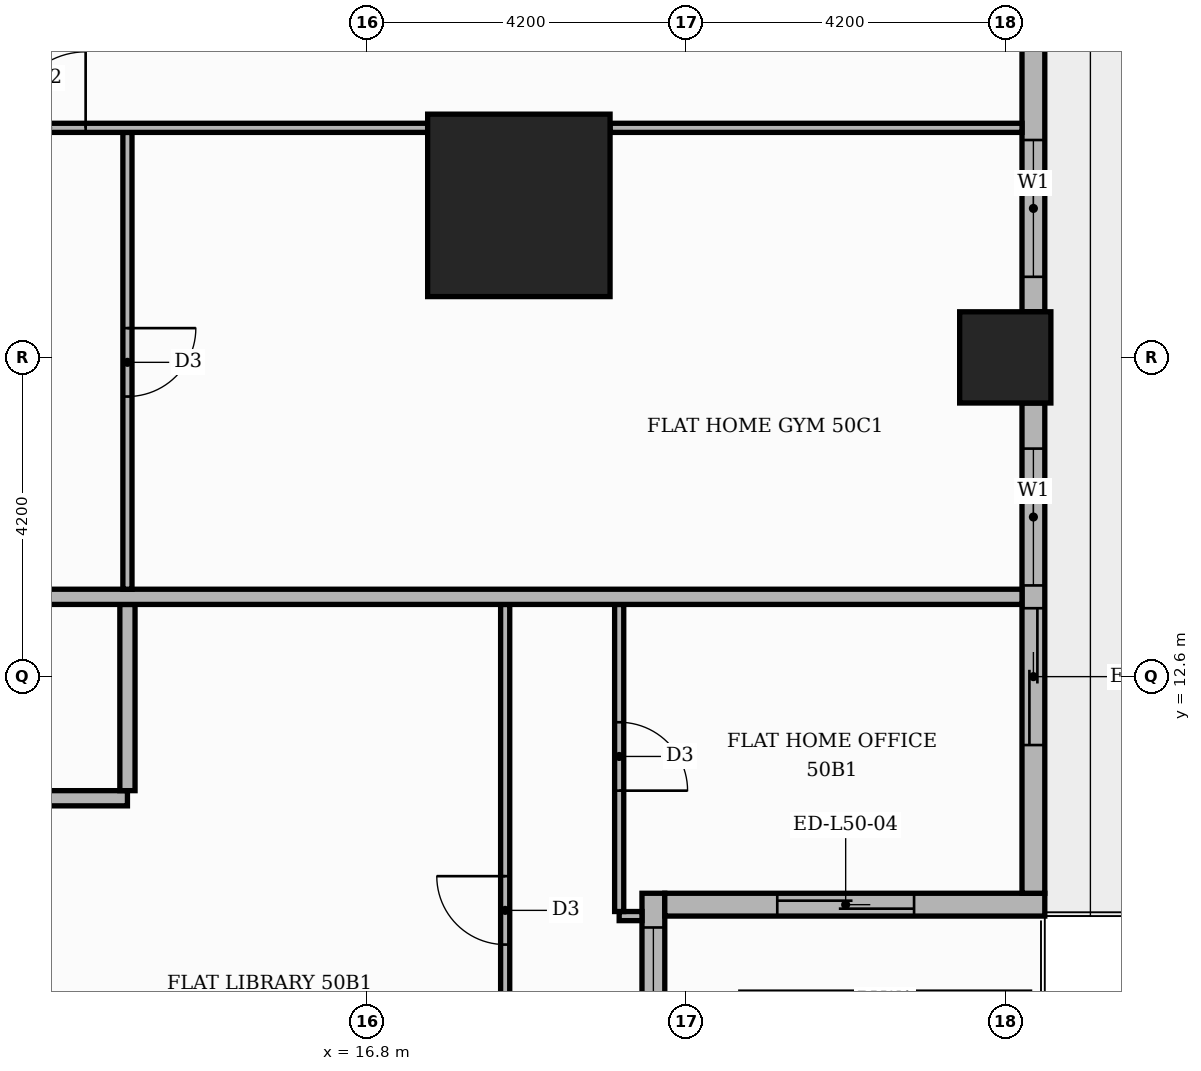
"""IFC4 building model, lengths in metres.
Left out: names, types, materials, properties, quantities, classifications, styles, units other than length and angle.
Written with IfcOpenShell. Run it as: python <this file> out.ifc"""

import sys

from ifc_helpers import new_model, si_unit, direction, frame, frame_2d, origin, origin_2d, place, context, subcontext, project, spatial, rectangle, extrude, element, fill, save


model = new_model("IFC4")
c1 = context("Model", 3, precision=1e-05, world=origin(), true_north=direction((0.0, 1.0)))
c2 = subcontext(c1, "Body", "Model", "MODEL_VIEW")
j1 = project(units=[si_unit("LENGTHUNIT", "METRE"), si_unit("PLANEANGLEUNIT", "RADIAN")], contexts=[c1])
p1 = place(None, origin())
s1 = spatial("IfcSite", under=j1, at=p1, CompositionType="ELEMENT")
p2 = place(p1, origin())
s2 = spatial("IfcBuilding", under=s1, at=p2, CompositionType="ELEMENT")
p3 = place(p2, frame((0.0, 0.0, 211.8)))
s3 = spatial("IfcBuildingStorey", under=s2, at=p3, CompositionType="ELEMENT", Elevation=211.8)
p4 = place(p3, frame((18.8, 18.8, 0.0), z_axis=(0.0, 0.0, 1.0), x_axis=(1.0, 0.0, 0.0)))
e1 = element("IfcColumn", 1, at=p4, inside=s3, PredefinedType="COLUMN", context=c2, shape_type="SweptSolid", body=[
    extrude(rectangle(XDim=2.4, YDim=2.4, at=origin_2d()), origin(), (0.0, 0.0, 1.0), 3.9),
])
p5 = place(p3, frame((25.2, 16.8, 0.0), z_axis=(0.0, 0.0, 1.0), x_axis=(1.0, 0.0, 0.0)))
e2 = element("IfcColumn", 2, at=p5, inside=s3, PredefinedType="COLUMN", context=c2, shape_type="SweptSolid", body=[
    extrude(rectangle(XDim=1.2, YDim=1.2, at=origin_2d()), origin(), (0.0, 0.0, 1.0), 3.9),
])
p6 = place(p3, frame((20.57, -9.45, 0.0), z_axis=(0.0, 0.0, 1.0), x_axis=(0.0, 1.0, 0.0)))
e3 = element("IfcWall", 3, at=p6, inside=s3, PredefinedType="STANDARD", context=c2, shape_type="SweptSolid", body=[
    extrude(rectangle(XDim=19.2, YDim=0.3, at=frame_2d((9.6, 0.0))), origin(), (0.0, 0.0, 1.0), 3.48),
])
p7 = place(p6, frame((0.15, 0.0, 0.9)))
e4 = element("IfcOpeningElement", 4, at=p7, cuts=e3, PredefinedType="OPENING", context=c2, shape_type="SweptSolid", body=[
    extrude(rectangle(XDim=6.0, YDim=2.1, at=frame_2d((3.0, 1.05))), frame((0.0, 0.16, 0.0), z_axis=(0.0, -1.0, 0.0), x_axis=(1.0, 0.0, 0.0)), (0.0, 0.0, 1.0), 0.32),
])
p8 = place(p6, frame((6.45, 0.0, 0.9)))
e5 = element("IfcOpeningElement", 5, at=p8, cuts=e3, PredefinedType="OPENING", context=c2, shape_type="SweptSolid", body=[
    extrude(rectangle(XDim=6.0, YDim=2.1, at=frame_2d((3.0, 1.05))), frame((0.0, 0.16, 0.0), z_axis=(0.0, -1.0, 0.0), x_axis=(1.0, 0.0, 0.0)), (0.0, 0.0, 1.0), 0.32),
])
p9 = place(p6, frame((12.75, 0.0, 0.9)))
e6 = element("IfcOpeningElement", 6, at=p9, cuts=e3, PredefinedType="OPENING", context=c2, shape_type="SweptSolid", body=[
    extrude(rectangle(XDim=6.0, YDim=2.1, at=frame_2d((3.0, 1.05))), frame((0.0, 0.16, 0.0), z_axis=(0.0, -1.0, 0.0), x_axis=(1.0, 0.0, 0.0)), (0.0, 0.0, 1.0), 0.32),
])
p10 = place(p3, frame((20.72, 9.6, 0.0), z_axis=(0.0, 0.0, 1.0), x_axis=(1.0, 0.0, 0.0)))
e7 = element("IfcWall", 7, at=p10, inside=s3, PredefinedType="STANDARD", context=c2, shape_type="SweptSolid", body=[
    extrude(rectangle(XDim=5.0, YDim=0.3, at=frame_2d((2.5, 0.0))), origin(), (0.0, 0.0, 1.0), 3.48),
])
p11 = place(p10, frame((1.48, 0.0, 0.0)))
e8 = element("IfcOpeningElement", 8, at=p11, cuts=e7, PredefinedType="OPENING", context=c2, shape_type="SweptSolid", body=[
    extrude(rectangle(XDim=1.8, YDim=2.4, at=frame_2d((0.9, 1.2))), frame((0.0, 0.16, 0.0), z_axis=(0.0, -1.0, 0.0), x_axis=(1.0, 0.0, 0.0)), (0.0, 0.0, 1.0), 0.32),
])
p12 = place(p3, frame((25.57, 9.75, 0.0), z_axis=(0.0, 0.0, 1.0), x_axis=(0.0, 1.0, 0.0)))
e9 = element("IfcWall", 9, at=p12, inside=s3, PredefinedType="STANDARD", context=c2, shape_type="SweptSolid", body=[
    extrude(rectangle(XDim=6.45, YDim=0.3, at=frame_2d((3.225, 0.0))), origin(), (0.0, 0.0, 1.0), 3.48),
])
p13 = place(p12, frame((1.95, 0.0, 0.0)))
e10 = element("IfcOpeningElement", 10, at=p13, cuts=e9, PredefinedType="OPENING", context=c2, shape_type="SweptSolid", body=[
    extrude(rectangle(XDim=1.8, YDim=2.4, at=frame_2d((0.9, 1.2))), frame((0.0, 0.16, 0.0), z_axis=(0.0, -1.0, 0.0), x_axis=(1.0, 0.0, 0.0)), (0.0, 0.0, 1.0), 0.32),
])
p14 = place(p12, frame((4.05, 0.0, 0.9)))
e11 = element("IfcOpeningElement", 11, at=p14, cuts=e9, PredefinedType="OPENING", context=c2, shape_type="SweptSolid", body=[
    extrude(rectangle(XDim=1.8, YDim=2.1, at=frame_2d((0.9, 1.05))), frame((0.0, 0.16, 0.0), z_axis=(0.0, -1.0, 0.0), x_axis=(1.0, 0.0, 0.0)), (0.0, 0.0, 1.0), 0.32),
])
p15 = place(p3, frame((25.57, 17.4, 0.0), z_axis=(0.0, 0.0, 1.0), x_axis=(0.0, 1.0, 0.0)))
e12 = element("IfcWall", 12, at=p15, inside=s3, PredefinedType="STANDARD", context=c2, shape_type="SweptSolid", body=[
    extrude(rectangle(XDim=3.82, YDim=0.3, at=frame_2d((1.91, 0.0))), origin(), (0.0, 0.0, 1.0), 3.48),
])
p16 = place(p15, frame((0.46, 0.0, 0.9)))
e13 = element("IfcOpeningElement", 13, at=p16, cuts=e12, PredefinedType="OPENING", context=c2, shape_type="SweptSolid", body=[
    extrude(rectangle(XDim=1.8, YDim=2.1, at=frame_2d((0.9, 1.05))), frame((0.0, 0.16, 0.0), z_axis=(0.0, -1.0, 0.0), x_axis=(1.0, 0.0, 0.0)), (0.0, 0.0, 1.0), 0.32),
])
p17 = place(p3, frame((18.62, 5.46, 0.0), z_axis=(0.0, 0.0, 1.0), x_axis=(0.0, 1.0, 0.0)))
e14 = element("IfcWall", 14, at=p17, inside=s3, PredefinedType="PARTITIONING", context=c2, shape_type="SweptSolid", body=[
    extrude(rectangle(XDim=8.09, YDim=0.12, at=frame_2d((4.045, 0.0))), origin(), (0.0, 0.0, 1.0), 3.48),
])
p18 = place(p17, frame((3.615, 0.0, 0.0)))
e15 = element("IfcOpeningElement", 15, at=p18, cuts=e14, PredefinedType="OPENING", context=c2, shape_type="SweptSolid", body=[
    extrude(rectangle(XDim=0.9, YDim=2.1, at=frame_2d((0.45, 1.05))), frame((0.0, 0.07, 0.0), z_axis=(0.0, -1.0, 0.0), x_axis=(1.0, 0.0, 0.0)), (0.0, 0.0, 1.0), 0.14),
])
p19 = place(p3, frame((20.12, 9.45, 0.0), z_axis=(0.0, 0.0, 1.0), x_axis=(1.0, 0.0, 0.0)))
e16 = element("IfcWall", 16, at=p19, inside=s3, PredefinedType="PARTITIONING", context=c2, shape_type="SweptSolid", body=[
    extrude(rectangle(XDim=0.3, YDim=0.12, at=frame_2d((0.15, 0.0))), origin(), (0.0, 0.0, 1.0), 3.48),
])
p20 = place(p3, frame((20.12, 9.51, 0.0), z_axis=(0.0, 0.0, 1.0), x_axis=(0.0, 1.0, 0.0)))
e17 = element("IfcWall", 17, at=p20, inside=s3, PredefinedType="PARTITIONING", context=c2, shape_type="SweptSolid", body=[
    extrude(rectangle(XDim=4.04, YDim=0.12, at=frame_2d((2.02, 0.0))), origin(), (0.0, 0.0, 1.0), 3.48),
])
p21 = place(p20, frame((1.59, 0.0, 0.0)))
e18 = element("IfcOpeningElement", 18, at=p21, cuts=e17, PredefinedType="OPENING", context=c2, shape_type="SweptSolid", body=[
    extrude(rectangle(XDim=0.9, YDim=2.1, at=frame_2d((0.45, 1.05))), frame((0.0, 0.07, 0.0), z_axis=(0.0, -1.0, 0.0), x_axis=(1.0, 0.0, 0.0)), (0.0, 0.0, 1.0), 0.14),
])
p22 = place(p3, frame((11.0, 11.0, 0.0), z_axis=(0.0, 0.0, 1.0), x_axis=(1.0, 0.0, 0.0)))
e19 = element("IfcWall", 19, at=p22, inside=s3, PredefinedType="PARTITIONING", context=c2, shape_type="SweptSolid", body=[
    extrude(rectangle(XDim=2.65, YDim=0.2, at=frame_2d((1.325, 0.0))), origin(), (0.0, 0.0, 1.0), 3.48),
])
p23 = place(p3, frame((13.65, 11.1, 0.0), z_axis=(0.0, 0.0, 1.0), x_axis=(0.0, 1.0, 0.0)))
e20 = element("IfcWall", 20, at=p23, inside=s3, PredefinedType="PARTITIONING", context=c2, shape_type="SweptSolid", body=[
    extrude(rectangle(XDim=2.45, YDim=0.2, at=frame_2d((1.225, 0.0))), origin(), (0.0, 0.0, 1.0), 3.48),
])
p24 = place(p3, frame((-13.65, 13.65, 0.0), z_axis=(0.0, 0.0, 1.0), x_axis=(1.0, 0.0, 0.0)))
e21 = element("IfcWall", 21, at=p24, inside=s3, PredefinedType="PARTITIONING", context=c2, shape_type="SweptSolid", body=[
    extrude(rectangle(XDim=39.07, YDim=0.2, at=frame_2d((19.535, 0.0))), origin(), (0.0, 0.0, 1.0), 3.48),
])
p25 = place(p24, frame((23.6, 0.0, 0.0)))
e22 = element("IfcOpeningElement", 22, at=p25, cuts=e21, PredefinedType="OPENING", context=c2, shape_type="SweptSolid", body=[
    extrude(rectangle(XDim=1.1, YDim=2.4, at=frame_2d((0.55, 1.2))), frame((0.0, 0.11, 0.0), z_axis=(0.0, -1.0, 0.0), x_axis=(1.0, 0.0, 0.0)), (0.0, 0.0, 1.0), 0.22),
])
p26 = place(p3, frame((13.65, 13.75, 0.0), z_axis=(0.0, 0.0, 1.0), x_axis=(0.0, 1.0, 0.0)))
e23 = element("IfcWall", 23, at=p26, inside=s3, PredefinedType="PARTITIONING", context=c2, shape_type="SweptSolid", body=[
    extrude(rectangle(XDim=6.01, YDim=0.12, at=frame_2d((3.005, 0.0))), origin(), (0.0, 0.0, 1.0), 3.48),
])
p27 = place(p26, frame((2.535, 0.0, 0.0)))
e24 = element("IfcOpeningElement", 24, at=p27, cuts=e23, PredefinedType="OPENING", context=c2, shape_type="SweptSolid", body=[
    extrude(rectangle(XDim=0.9, YDim=2.1, at=frame_2d((0.45, 1.05))), frame((0.0, 0.07, 0.0), z_axis=(0.0, -1.0, 0.0), x_axis=(1.0, 0.0, 0.0)), (0.0, 0.0, 1.0), 0.14),
])
p28 = place(p3, frame((-13.55, 19.82, 0.0), z_axis=(0.0, 0.0, 1.0), x_axis=(1.0, 0.0, 0.0)))
e25 = element("IfcWall", 25, at=p28, inside=s3, PredefinedType="PARTITIONING", context=c2, shape_type="SweptSolid", body=[
    extrude(rectangle(XDim=31.15, YDim=0.12, at=frame_2d((15.575, 0.0))), origin(), (0.0, 0.0, 1.0), 3.48),
])
p29 = place(p28, frame((25.65, 0.0, 0.0)))
e26 = element("IfcOpeningElement", 26, at=p29, cuts=e25, PredefinedType="OPENING", context=c2, shape_type="SweptSolid", body=[
    extrude(rectangle(XDim=1.0, YDim=2.1, at=frame_2d((0.5, 1.05))), frame((0.0, 0.07, 0.0), z_axis=(0.0, -1.0, 0.0), x_axis=(1.0, 0.0, 0.0)), (0.0, 0.0, 1.0), 0.14),
])
p30 = place(p28, frame((20.4, 0.0, 0.0)))
e27 = element("IfcOpeningElement", 27, at=p30, cuts=e25, PredefinedType="OPENING", context=c2, shape_type="SweptSolid", body=[
    extrude(rectangle(XDim=1.0, YDim=2.1, at=frame_2d((0.5, 1.05))), frame((0.0, 0.07, 0.0), z_axis=(0.0, -1.0, 0.0), x_axis=(1.0, 0.0, 0.0)), (0.0, 0.0, 1.0), 0.14),
])
p31 = place(p28, frame((13.1, 0.0, 0.0)))
e28 = element("IfcOpeningElement", 28, at=p31, cuts=e25, PredefinedType="OPENING", context=c2, shape_type="SweptSolid", body=[
    extrude(rectangle(XDim=0.9, YDim=2.1, at=frame_2d((0.45, 1.05))), frame((0.0, 0.07, 0.0), z_axis=(0.0, -1.0, 0.0), x_axis=(1.0, 0.0, 0.0)), (0.0, 0.0, 1.0), 0.14),
])
p32 = place(p28, frame((3.65, 0.0, 0.0)))
e29 = element("IfcOpeningElement", 29, at=p32, cuts=e25, PredefinedType="OPENING", context=c2, shape_type="SweptSolid", body=[
    extrude(rectangle(XDim=0.9, YDim=2.1, at=frame_2d((0.45, 1.05))), frame((0.0, 0.07, 0.0), z_axis=(0.0, -1.0, 0.0), x_axis=(1.0, 0.0, 0.0)), (0.0, 0.0, 1.0), 0.14),
])
p33 = place(p3, frame((20.0, 19.82, 0.0), z_axis=(0.0, 0.0, 1.0), x_axis=(1.0, 0.0, 0.0)))
e30 = element("IfcWall", 30, at=p33, inside=s3, PredefinedType="PARTITIONING", context=c2, shape_type="SweptSolid", body=[
    extrude(rectangle(XDim=5.42, YDim=0.12, at=frame_2d((2.71, 0.0))), origin(), (0.0, 0.0, 1.0), 3.48),
])
p34 = place(p9, origin())
e31 = element("IfcWindow", 31, at=p34, inside=s3, PartitioningType="SINGLE_PANEL", PredefinedType="WINDOW", context=c2, shape_type="SweptSolid", body=[
    extrude(rectangle(XDim=6.0, YDim=2.1, at=frame_2d((3.0, 1.05))), frame((0.0, 0.03, 0.0), z_axis=(0.0, -1.0, 0.0), x_axis=(1.0, 0.0, 0.0)), (0.0, 0.0, 1.0), 0.06),
])
fill(e6, e31)
p35 = place(p11, origin())
e32 = element("IfcDoor", 32, at=p35, inside=s3, OperationType="SLIDING_TO_RIGHT", PredefinedType="DOOR", context=c2, shape_type="SweptSolid", body=[
    extrude(rectangle(XDim=1.8, YDim=2.4, at=frame_2d((0.9, 1.2))), frame((0.0, 0.025, 0.0), z_axis=(0.0, -1.0, 0.0), x_axis=(1.0, 0.0, 0.0)), (0.0, 0.0, 1.0), 0.05),
])
fill(e8, e32)
p36 = place(p13, origin())
e33 = element("IfcDoor", 33, at=p36, inside=s3, OperationType="SLIDING_TO_RIGHT", PredefinedType="DOOR", context=c2, shape_type="SweptSolid", body=[
    extrude(rectangle(XDim=1.8, YDim=2.4, at=frame_2d((0.9, 1.2))), frame((0.0, 0.025, 0.0), z_axis=(0.0, -1.0, 0.0), x_axis=(1.0, 0.0, 0.0)), (0.0, 0.0, 1.0), 0.05),
])
fill(e10, e33)
p37 = place(p14, origin())
e34 = element("IfcWindow", 34, at=p37, inside=s3, PartitioningType="SINGLE_PANEL", PredefinedType="WINDOW", context=c2, shape_type="SweptSolid", body=[
    extrude(rectangle(XDim=1.8, YDim=2.1, at=frame_2d((0.9, 1.05))), frame((0.0, 0.03, 0.0), z_axis=(0.0, -1.0, 0.0), x_axis=(1.0, 0.0, 0.0)), (0.0, 0.0, 1.0), 0.06),
])
fill(e11, e34)
p38 = place(p16, origin())
e35 = element("IfcWindow", 35, at=p38, inside=s3, PartitioningType="SINGLE_PANEL", PredefinedType="WINDOW", context=c2, shape_type="SweptSolid", body=[
    extrude(rectangle(XDim=1.8, YDim=2.1, at=frame_2d((0.9, 1.05))), frame((0.0, 0.03, 0.0), z_axis=(0.0, -1.0, 0.0), x_axis=(1.0, 0.0, 0.0)), (0.0, 0.0, 1.0), 0.06),
])
fill(e13, e35)
p39 = place(p18, origin())
e36 = element("IfcDoor", 36, at=p39, inside=s3, OperationType="SINGLE_SWING_RIGHT", PredefinedType="DOOR", context=c2, shape_type="SweptSolid", body=[
    extrude(rectangle(XDim=0.9, YDim=2.1, at=frame_2d((0.45, 1.05))), frame((0.0, 0.025, 0.0), z_axis=(0.0, -1.0, 0.0), x_axis=(1.0, 0.0, 0.0)), (0.0, 0.0, 1.0), 0.05),
])
fill(e15, e36)
p40 = place(p21, frame((0.9, 0.0, 0.0), z_axis=(0.0, 0.0, 1.0), x_axis=(-1.0, 0.0, 0.0)))
e37 = element("IfcDoor", 37, at=p40, inside=s3, OperationType="SINGLE_SWING_LEFT", PredefinedType="DOOR", context=c2, shape_type="SweptSolid", body=[
    extrude(rectangle(XDim=0.9, YDim=2.1, at=frame_2d((0.45, 1.05))), frame((0.0, 0.025, 0.0), z_axis=(0.0, -1.0, 0.0), x_axis=(1.0, 0.0, 0.0)), (0.0, 0.0, 1.0), 0.05),
])
fill(e18, e37)
p41 = place(p27, frame((0.9, 0.0, 0.0), z_axis=(0.0, 0.0, 1.0), x_axis=(-1.0, 0.0, 0.0)))
e38 = element("IfcDoor", 38, at=p41, inside=s3, OperationType="SINGLE_SWING_RIGHT", PredefinedType="DOOR", context=c2, shape_type="SweptSolid", body=[
    extrude(rectangle(XDim=0.9, YDim=2.1, at=frame_2d((0.45, 1.05))), frame((0.0, 0.025, 0.0), z_axis=(0.0, -1.0, 0.0), x_axis=(1.0, 0.0, 0.0)), (0.0, 0.0, 1.0), 0.05),
])
fill(e24, e38)
p42 = place(p29, origin())
e39 = element("IfcDoor", 39, at=p42, inside=s3, OperationType="SINGLE_SWING_RIGHT", PredefinedType="DOOR", context=c2, shape_type="SweptSolid", body=[
    extrude(rectangle(XDim=1.0, YDim=2.1, at=frame_2d((0.5, 1.05))), frame((0.0, 0.025, 0.0), z_axis=(0.0, -1.0, 0.0), x_axis=(1.0, 0.0, 0.0)), (0.0, 0.0, 1.0), 0.05),
])
fill(e26, e39)
save(model, sys.argv[1])
